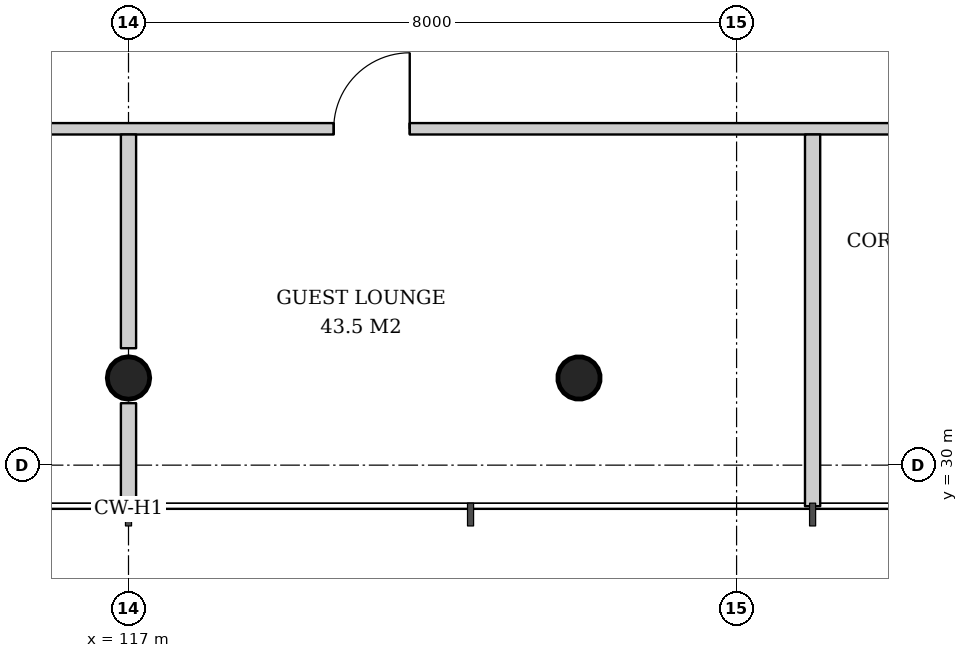
"""IFC4 building model, lengths in metres.
Left out: names, types, materials, properties, quantities, classifications, styles, units other than length and angle.
Written with IfcOpenShell. Run it as: python <this file> out.ifc"""

import sys

from ifc_helpers import new_model, si_unit, direction, frame, frame_2d, origin, origin_2d, place, context, subcontext, project, spatial, rectangle, hollow_circle, extrude, element, fill, save


model = new_model("IFC4")
c1 = context("Model", 3, precision=1e-05, world=origin(), true_north=direction((0.0, 1.0)))
c2 = subcontext(c1, "Body", "Model", "MODEL_VIEW")
j1 = project(units=[si_unit("LENGTHUNIT", "METRE"), si_unit("PLANEANGLEUNIT", "RADIAN")], contexts=[c1])
p1 = place(None, origin())
s1 = spatial("IfcSite", under=j1, at=p1, CompositionType="ELEMENT")
p2 = place(p1, origin())
s2 = spatial("IfcBuilding", under=s1, at=p2, CompositionType="ELEMENT")
p3 = place(p2, frame((0.0, 0.0, 116.0)))
s3 = spatial("IfcBuildingStorey", under=s2, at=p3, CompositionType="ELEMENT", Elevation=116.0)
p4 = place(p3, frame((117.0, 31.095, 0.0), z_axis=(0.0, 0.043069538298, 0.999072076915), x_axis=(-1.0, 0.0, 0.0)))
e1 = element("IfcColumn", 1, at=p4, inside=s3, PredefinedType="COLUMN", context=c2, shape_type="SweptSolid", body=[
    extrude(hollow_circle(Radius=0.28, WallThickness=0.02, at=origin_2d()), origin(), (0.0, 0.0, 1.0), 3.803),
])
p5 = place(p3, frame((122.953, 31.095, 0.0), z_axis=(-0.021561848751, 0.043059525333, 0.998839808957), x_axis=(-0.894160516368, -0.44774654769, 0.0)))
e2 = element("IfcColumn", 2, at=p5, inside=s3, PredefinedType="COLUMN", context=c2, shape_type="SweptSolid", body=[
    extrude(hollow_circle(Radius=0.28, WallThickness=0.02, at=origin_2d()), origin(), (0.0, 0.0, 1.0), 3.804),
])
p6 = place(p3, frame((106.207, 34.425, 0.0), z_axis=(0.0, 0.0, 1.0), x_axis=(1.0, 0.0, 0.0)))
e3 = element("IfcWall", 3, at=p6, inside=s3, PredefinedType="PARTITIONING", context=c2, shape_type="SweptSolid", body=[
    extrude(rectangle(XDim=21.586, YDim=0.15, at=frame_2d((10.793, 0.0))), origin(), (0.0, 0.0, 1.0), 2.9),
])
p7 = place(p6, frame((0.2, 0.0, 0.0)))
e4 = element("IfcOpeningElement", 4, at=p7, cuts=e3, PredefinedType="OPENING", context=c2, shape_type="SweptSolid", body=[
    extrude(rectangle(XDim=0.9, YDim=2.1, at=frame_2d((0.45, 1.05))), frame((0.0, 0.085, 0.0), z_axis=(0.0, -1.0, 0.0), x_axis=(1.0, 0.0, 0.0)), (0.0, 0.0, 1.0), 0.17),
])
p8 = place(p6, frame((4.543, 0.0, 0.0)))
e5 = element("IfcOpeningElement", 5, at=p8, cuts=e3, PredefinedType="OPENING", context=c2, shape_type="SweptSolid", body=[
    extrude(rectangle(XDim=0.9, YDim=2.1, at=frame_2d((0.45, 1.05))), frame((0.0, 0.085, 0.0), z_axis=(0.0, -1.0, 0.0), x_axis=(1.0, 0.0, 0.0)), (0.0, 0.0, 1.0), 0.17),
])
p9 = place(p6, frame((13.493, 0.0, 0.0)))
e6 = element("IfcOpeningElement", 6, at=p9, cuts=e3, PredefinedType="OPENING", context=c2, shape_type="SweptSolid", body=[
    extrude(rectangle(XDim=1.0, YDim=2.1, at=frame_2d((0.5, 1.05))), frame((0.0, 0.085, 0.0), z_axis=(0.0, -1.0, 0.0), x_axis=(1.0, 0.0, 0.0)), (0.0, 0.0, 1.0), 0.17),
])
p10 = place(p3, frame((117.0, 34.35, 0.0), z_axis=(0.0, 0.0, 1.0), x_axis=(0.0, -1.0, 0.0)))
e7 = element("IfcWall", 7, at=p10, inside=s3, PredefinedType="PARTITIONING", context=c2, shape_type="SweptSolid", body=[
    extrude(rectangle(XDim=2.812, YDim=0.2, at=frame_2d((1.406, 0.0))), origin(), (0.0, 0.0, 1.0), 3.6),
])
p11 = place(p3, frame((117.0, 30.815, 0.0), z_axis=(0.0, 0.0, 1.0), x_axis=(0.0, -1.0, 0.0)))
e8 = element("IfcWall", 8, at=p11, inside=s3, PredefinedType="PARTITIONING", context=c2, shape_type="SweptSolid", body=[
    extrude(rectangle(XDim=1.355, YDim=0.2, at=frame_2d((0.678, 0.0))), origin(), (0.0, 0.0, 1.0), 3.6),
])
p12 = place(p3, frame((126.0, 34.35, 0.0), z_axis=(0.0, 0.0, 1.0), x_axis=(0.0, -1.0, 0.0)))
e9 = element("IfcWall", 9, at=p12, inside=s3, PredefinedType="PARTITIONING", context=c2, shape_type="SweptSolid", body=[
    extrude(rectangle(XDim=4.89, YDim=0.2, at=frame_2d((2.445, 0.0))), origin(), (0.0, 0.0, 1.0), 3.2),
])
p13 = place(p9, origin())
e10 = element("IfcDoor", 10, at=p13, inside=s3, OperationType="SINGLE_SWING_RIGHT", PredefinedType="DOOR", context=c2, shape_type="SweptSolid", body=[
    extrude(rectangle(XDim=1.0, YDim=2.1, at=frame_2d((0.5, 1.05))), frame((0.0, 0.025, 0.0), z_axis=(0.0, -1.0, 0.0), x_axis=(1.0, 0.0, 0.0)), (0.0, 0.0, 1.0), 0.05),
])
fill(e6, e10)
save(model, sys.argv[1])
